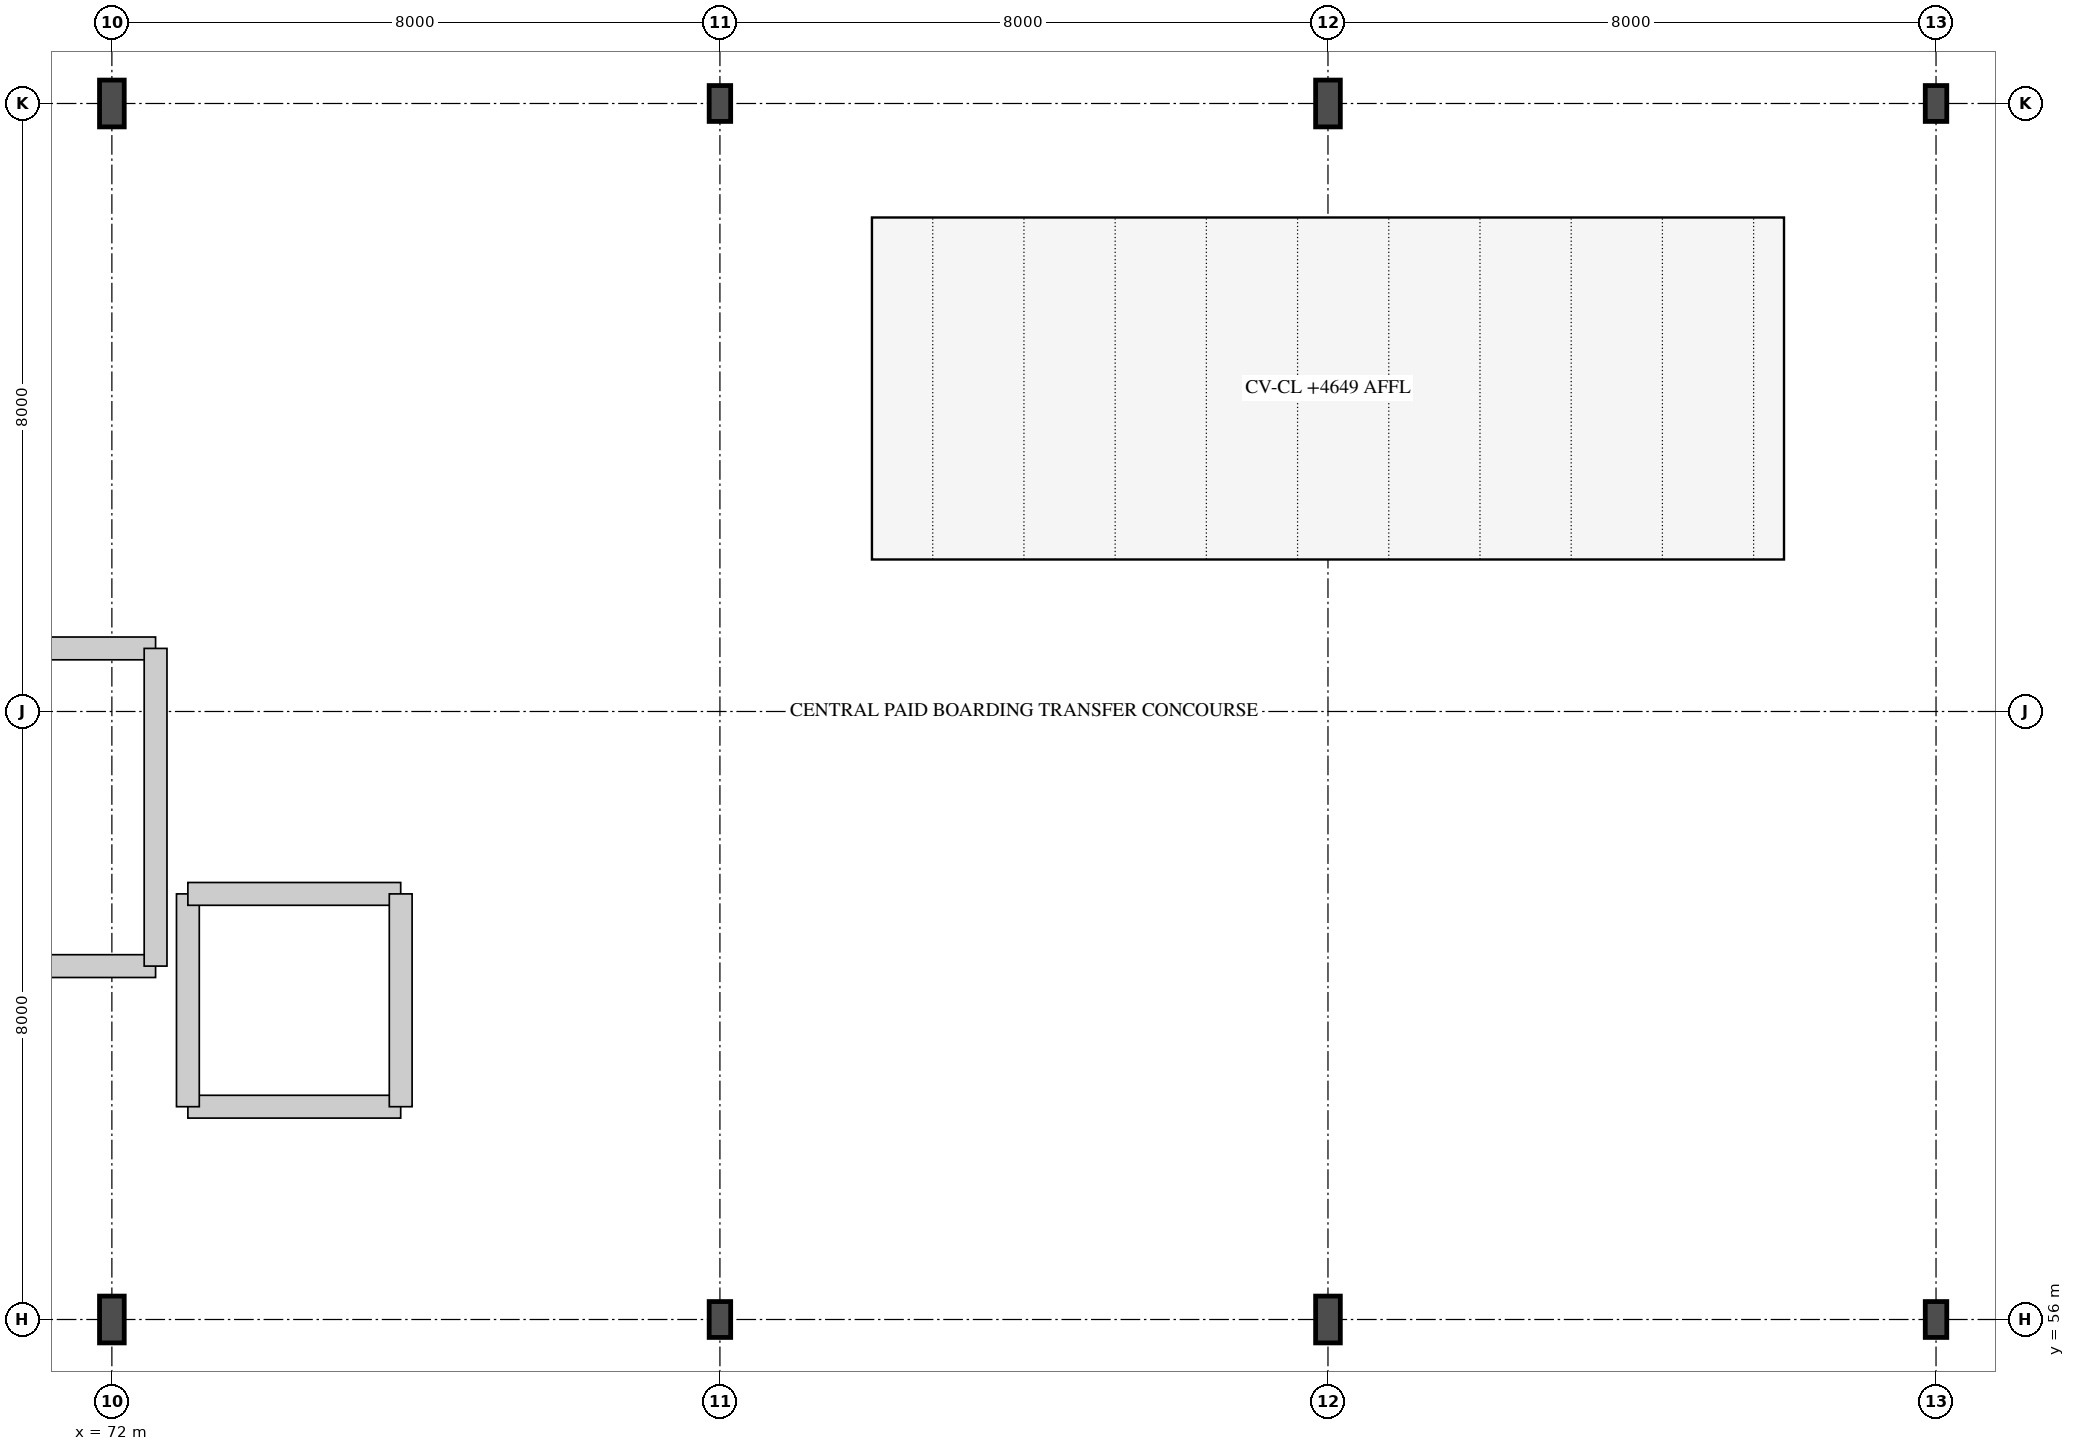
"""IFC4 building model, lengths in metres.
Left out: names, types, materials, properties, quantities, classifications, styles, units other than length and angle.
Written with IfcOpenShell. Run it as: python <this file> out.ifc"""

import sys

from ifc_helpers import new_model, si_unit, direction, frame, frame_2d, origin, origin_2d, place, context, subcontext, project, spatial, rectangle, i_section, extrude, element, fill, save


model = new_model("IFC4")
c1 = context("Model", 3, precision=1e-05, world=origin(), true_north=direction((0.0, 1.0)))
c2 = subcontext(c1, "Body", "Model", "MODEL_VIEW")
j1 = project(units=[si_unit("LENGTHUNIT", "METRE"), si_unit("PLANEANGLEUNIT", "RADIAN")], contexts=[c1])
p1 = place(None, origin())
s1 = spatial("IfcSite", under=j1, at=p1, CompositionType="ELEMENT")
p2 = place(p1, origin())
s2 = spatial("IfcBuilding", under=s1, at=p2, CompositionType="ELEMENT")
p3 = place(p2, frame((0.0, 0.0, 9.6)))
s3 = spatial("IfcBuildingStorey", under=s2, at=p3, CompositionType="ELEMENT", Elevation=9.6)
for number, where, z_axis, x_axis in (
    (1, (72.0, 56.0, 0.0), (0.0, 0.0, 1.0), (1.0, 0.0, 0.0)),
    (2, (72.0, 72.0, 0.0), (0.0, 0.0, 1.0), (1.0, 0.0, 0.0)),
):
    element("IfcColumn", number, at=place(p3, frame(where, z_axis=z_axis, x_axis=x_axis)), inside=s3, PredefinedType="COLUMN", context=c2, shape_type="SweptSolid", body=[
        extrude(i_section(OverallWidth=0.325, OverallDepth=0.616, WebThickness=0.014, FlangeThickness=0.021, FilletRadius=0.018, at=origin_2d()), origin(), (0.0, 0.0, 1.0), 5.4),
    ])
for number, where, z_axis, x_axis in (
    (3, (80.0, 56.0, 0.0), (0.0, 0.0, 1.0), (1.0, 0.0, 0.0)),
    (4, (80.0, 72.0, 0.0), (0.0, 0.0, 1.0), (1.0, 0.0, 0.0)),
):
    element("IfcColumn", number, at=place(p3, frame(where, z_axis=z_axis, x_axis=x_axis)), inside=s3, PredefinedType="COLUMN", context=c2, shape_type="SweptSolid", body=[
        extrude(i_section(OverallWidth=0.283, OverallDepth=0.472, WebThickness=0.014, FlangeThickness=0.022, FilletRadius=0.015, at=origin_2d()), origin(), (0.0, 0.0, 1.0), 5.4),
    ])
for number, where, z_axis, x_axis in (
    (5, (88.0, 56.0, 0.0), (0.0, 0.0, 1.0), (1.0, 0.0, 0.0)),
    (6, (88.0, 72.0, 0.0), (0.0, 0.0, 1.0), (1.0, 0.0, 0.0)),
):
    element("IfcColumn", number, at=place(p3, frame(where, z_axis=z_axis, x_axis=x_axis)), inside=s3, PredefinedType="COLUMN", context=c2, shape_type="SweptSolid", body=[
        extrude(i_section(OverallWidth=0.325, OverallDepth=0.616, WebThickness=0.014, FlangeThickness=0.021, FilletRadius=0.018, at=origin_2d()), origin(), (0.0, 0.0, 1.0), 5.4),
    ])
for number, where, z_axis, x_axis in (
    (7, (96.0, 56.0, 0.0), (0.0, 0.0, 1.0), (1.0, 0.0, 0.0)),
    (8, (96.0, 72.0, 0.0), (0.0, 0.0, 1.0), (1.0, 0.0, 0.0)),
):
    element("IfcColumn", number, at=place(p3, frame(where, z_axis=z_axis, x_axis=x_axis)), inside=s3, PredefinedType="COLUMN", context=c2, shape_type="SweptSolid", body=[
        extrude(i_section(OverallWidth=0.283, OverallDepth=0.472, WebThickness=0.014, FlangeThickness=0.022, FilletRadius=0.015, at=origin_2d()), origin(), (0.0, 0.0, 1.0), 5.4),
    ])
for number, where, z_axis, x_axis in (
    (9, (72.575, 60.65, 0.0), (0.0, 0.0, 1.0), (-1.0, 0.0, 0.0)),
    (10, (64.85, 64.83, 0.0), (0.0, 0.0, 1.0), (1.0, 0.0, 0.0)),
):
    element("IfcWall", number, at=place(p3, frame(where, z_axis=z_axis, x_axis=x_axis)), inside=s3, PredefinedType="SHEAR", context=c2, shape_type="SweptSolid", body=[
        extrude(rectangle(XDim=7.725, YDim=0.3, at=frame_2d((3.862, 0.0))), origin(), (0.0, 0.0, 1.0), 9.7),
    ])
p4 = place(p3, frame((72.575, 64.83, 0.0), z_axis=(0.0, 0.0, 1.0), x_axis=(0.0, -1.0, 0.0)))
e11 = element("IfcWall", 11, at=p4, inside=s3, PredefinedType="SHEAR", context=c2, shape_type="SweptSolid", body=[
    extrude(rectangle(XDim=4.18, YDim=0.3, at=frame_2d((2.09, 0.0))), origin(), (0.0, 0.0, 1.0), 9.7),
])
for number, where, z_axis, x_axis in (
    (12, (75.8, 58.8, 0.0), (0.0, 0.0, 1.0), (-1.0, 0.0, 0.0)),
    (13, (73.0, 58.8, 0.0), (0.0, 0.0, 1.0), (0.0, 1.0, 0.0)),
):
    element("IfcWall", number, at=place(p3, frame(where, z_axis=z_axis, x_axis=x_axis)), inside=s3, PredefinedType="SHEAR", context=c2, shape_type="SweptSolid", body=[
        extrude(rectangle(XDim=2.8, YDim=0.3, at=frame_2d((1.4, 0.0))), origin(), (0.0, 0.0, 1.0), 5.15),
    ])
p5 = place(p3, frame((73.0, 61.6, 0.0), z_axis=(0.0, 0.0, 1.0), x_axis=(1.0, 0.0, 0.0)))
e14 = element("IfcWall", 14, at=p5, inside=s3, PredefinedType="SHEAR", context=c2, shape_type="SweptSolid", body=[
    extrude(rectangle(XDim=2.8, YDim=0.3, at=frame_2d((1.4, 0.0))), origin(), (0.0, 0.0, 1.0), 5.15),
])
p6 = place(p5, frame((0.75, 0.0, 0.0)))
e15 = element("IfcOpeningElement", 15, at=p6, cuts=e14, PredefinedType="OPENING", context=c2, shape_type="SweptSolid", body=[
    extrude(rectangle(XDim=1.3, YDim=2.25, at=frame_2d((0.65, 1.125))), frame((0.0, 0.16, 0.0), z_axis=(0.0, -1.0, 0.0), x_axis=(1.0, 0.0, 0.0)), (0.0, 0.0, 1.0), 0.32),
])
p7 = place(p3, frame((75.8, 61.6, 0.0), z_axis=(0.0, 0.0, 1.0), x_axis=(0.0, -1.0, 0.0)))
e16 = element("IfcWall", 16, at=p7, inside=s3, PredefinedType="SHEAR", context=c2, shape_type="SweptSolid", body=[
    extrude(rectangle(XDim=2.8, YDim=0.3, at=frame_2d((1.4, 0.0))), origin(), (0.0, 0.0, 1.0), 5.15),
])
p8 = place(p6, origin())
e17 = element("IfcDoor", 17, at=p8, inside=s3, OperationType="DOUBLE_DOOR_SLIDING", PredefinedType="DOOR", context=c2, shape_type="SweptSolid", body=[
    extrude(rectangle(XDim=1.3, YDim=2.25, at=frame_2d((0.65, 1.125))), frame((0.0, 0.025, 0.0), z_axis=(0.0, -1.0, 0.0), x_axis=(1.0, 0.0, 0.0)), (0.0, 0.0, 1.0), 0.05),
])
fill(e15, e17)
save(model, sys.argv[1])
